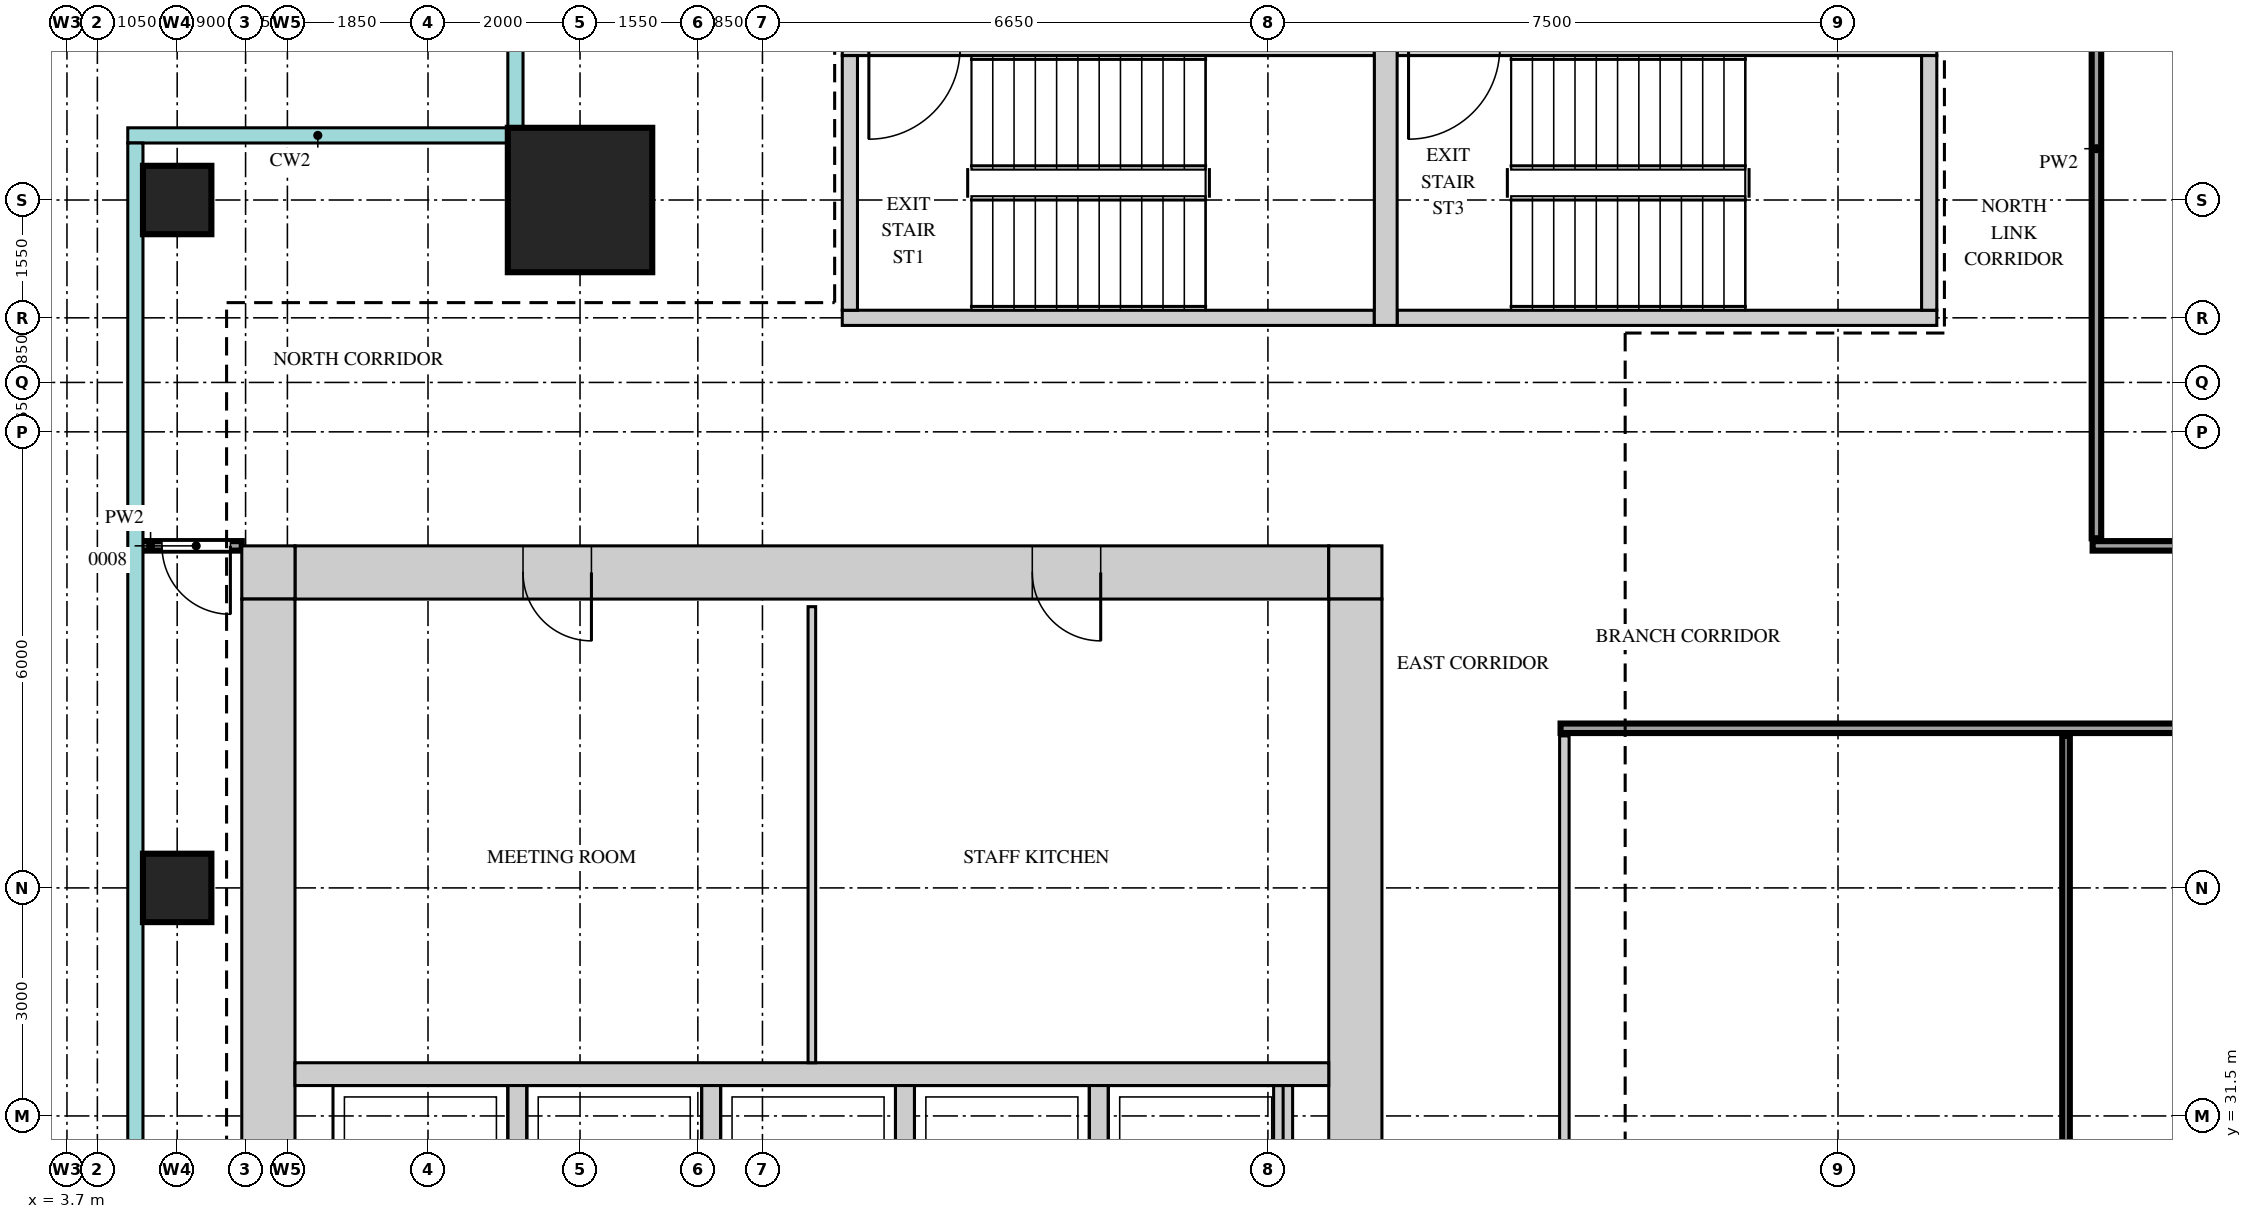
"""IFC4 building model, lengths in metres.
Left out: names, types, materials, properties, quantities, classifications, styles, units other than length and angle.
Written with IfcOpenShell. Run it as: python <this file> out.ifc"""

import sys

from ifc_helpers import new_model, si_unit, direction, frame, frame_2d, origin, origin_2d, place, context, subcontext, project, spatial, rectangle, extrude, source, transform, mapped, element, fill, save


model = new_model("IFC4")
c1 = context("Model", 3, precision=1e-05, world=origin(), true_north=direction((0.0, 1.0)))
c2 = subcontext(c1, "Body", "Model", "MODEL_VIEW")
j1 = project(units=[si_unit("LENGTHUNIT", "METRE"), si_unit("PLANEANGLEUNIT", "RADIAN")], contexts=[c1])
p1 = place(None, origin())
s1 = spatial("IfcSite", under=j1, at=p1, CompositionType="ELEMENT")
p2 = place(p1, origin())
s2 = spatial("IfcBuilding", under=s1, at=p2, CompositionType="ELEMENT")
p3 = place(p2, frame((0.0, 0.0, 230.2)))
s3 = spatial("IfcBuildingStorey", under=s2, at=p3, CompositionType="ELEMENT", Elevation=230.2)
m1 = source(origin(), c2, "Body", "SweptSolid", [
    extrude(rectangle(XDim=13.6, YDim=0.7, at=frame_2d((6.8, 0.0))), origin(), (0.0, 0.0, 1.0), 3.75),
])
p4 = place(p3, frame((6.7, 38.65, 0.0), z_axis=(0.0, 0.0, 1.0), x_axis=(1.0, 0.0, 0.0)))
e1 = element("IfcWall", 1, at=p4, inside=s3, PredefinedType="SHEAR", context=c2, shape_type="MappedRepresentation", body=[
    mapped(m1, transform((0.0, 0.0, 0.0))),
])
m2 = source(origin(), c2, "Body", "SweptSolid", [
    extrude(rectangle(XDim=0.9, YDim=2.1, at=frame_2d((0.45, 1.05))), frame((0.0, 0.36, 0.0), z_axis=(0.0, -1.0, 0.0), x_axis=(1.0, 0.0, 0.0)), (0.0, 0.0, 1.0), 0.72),
])
p5 = place(p4, frame((3.0, 0.0, 0.0)))
e2 = element("IfcOpeningElement", 2, at=p5, cuts=e1, PredefinedType="OPENING", context=c2, shape_type="MappedRepresentation", body=[
    mapped(m2, transform((0.0, 0.0, 0.0))),
])
p6 = place(p4, frame((9.7, 0.0, 0.0)))
e3 = element("IfcOpeningElement", 3, at=p6, cuts=e1, PredefinedType="OPENING", context=c2, shape_type="MappedRepresentation", body=[
    mapped(m2, transform((0.0, 0.0, 0.0))),
])
m3 = source(origin(), c2, "Body", "SweptSolid", [
    extrude(rectangle(XDim=0.7, YDim=0.7, at=frame_2d((0.35, 0.0))), origin(), (0.0, 0.0, 1.0), 3.75),
])
for number, where, z_axis, x_axis in (
    (4, (20.3, 38.65, 0.0), (0.0, 0.0, 1.0), (1.0, 0.0, 0.0)),
    (5, (6.0, 38.65, 0.0), (0.0, 0.0, 1.0), (1.0, 0.0, 0.0)),
):
    element("IfcWall", number, at=place(p3, frame(where, z_axis=z_axis, x_axis=x_axis)), inside=s3, PredefinedType="SHEAR", context=c2, shape_type="MappedRepresentation", body=[
        mapped(m3, transform((0.0, 0.0, 0.0))),
    ])
m4 = source(origin(), c2, "Body", "SweptSolid", [
    extrude(rectangle(XDim=22.6, YDim=0.7, at=frame_2d((11.3, 0.0))), origin(), (0.0, 0.0, 1.0), 3.75),
])
p7 = place(p3, frame((20.65, 15.7, 0.0), z_axis=(0.0, 0.0, 1.0), x_axis=(0.0, 1.0, 0.0)))
e6 = element("IfcWall", 6, at=p7, inside=s3, PredefinedType="SHEAR", context=c2, shape_type="MappedRepresentation", body=[
    mapped(m4, transform((0.0, 0.0, 0.0))),
])
m5 = source(origin(), c2, "Body", "SweptSolid", [
    extrude(rectangle(XDim=1.8, YDim=2.1, at=frame_2d((0.9, 1.05))), frame((0.0, 0.36, 0.0), z_axis=(0.0, -1.0, 0.0), x_axis=(1.0, 0.0, 0.0)), (0.0, 0.0, 1.0), 0.72),
])
p8 = place(p7, frame((10.8, 0.0, 0.0)))
e7 = element("IfcOpeningElement", 7, at=p8, cuts=e6, PredefinedType="OPENING", context=c2, shape_type="MappedRepresentation", body=[
    mapped(m5, transform((0.0, 0.0, 0.0))),
])
p9 = place(p7, frame((0.45, 0.0, 0.0)))
e8 = element("IfcOpeningElement", 8, at=p9, cuts=e6, PredefinedType="OPENING", context=c2, shape_type="MappedRepresentation", body=[
    mapped(m2, transform((0.0, 0.0, 0.0))),
])
p10 = place(p7, frame((2.9, 0.0, 0.0)))
e9 = element("IfcOpeningElement", 9, at=p10, cuts=e6, PredefinedType="OPENING", context=c2, shape_type="MappedRepresentation", body=[
    mapped(m2, transform((0.0, 0.0, 0.0))),
])
p11 = place(p7, frame((5.65, 0.0, 0.0)))
e10 = element("IfcOpeningElement", 10, at=p11, cuts=e6, PredefinedType="OPENING", context=c2, shape_type="MappedRepresentation", body=[
    mapped(m2, transform((0.0, 0.0, 0.0))),
])
p12 = place(p3, frame((6.35, 15.7, 0.0), z_axis=(0.0, 0.0, 1.0), x_axis=(0.0, 1.0, 0.0)))
e11 = element("IfcWall", 11, at=p12, inside=s3, PredefinedType="SHEAR", context=c2, shape_type="MappedRepresentation", body=[
    mapped(m4, transform((0.0, 0.0, 0.0))),
])
m6 = source(origin(), c2, "Body", "SweptSolid", [
    extrude(rectangle(XDim=7.0, YDim=0.2, at=frame_2d((3.5, 0.0))), origin(), (0.0, 0.0, 1.0), 3.75),
])
p13 = place(p3, frame((13.9, 45.55, 0.0), z_axis=(0.0, 0.0, 1.0), x_axis=(1.0, 0.0, 0.0)))
e12 = element("IfcWall", 12, at=p13, inside=s3, PredefinedType="SHEAR", context=c2, shape_type="MappedRepresentation", body=[
    mapped(m6, transform((0.0, 0.0, 0.0))),
])
m7 = source(origin(), c2, "Body", "SweptSolid", [
    extrude(rectangle(XDim=1.2, YDim=2.1, at=frame_2d((0.6, 1.05))), frame((0.0, 0.11, 0.0), z_axis=(0.0, -1.0, 0.0), x_axis=(1.0, 0.0, 0.0)), (0.0, 0.0, 1.0), 0.22),
])
p14 = place(p13, frame((0.35, 0.0, 0.0)))
e13 = element("IfcOpeningElement", 13, at=p14, cuts=e12, PredefinedType="OPENING", context=c2, shape_type="MappedRepresentation", body=[
    mapped(m7, transform((0.0, 0.0, 0.0))),
])
p15 = place(p3, frame((13.9, 42.0, 0.0), z_axis=(0.0, 0.0, 1.0), x_axis=(1.0, 0.0, 0.0)))
e14 = element("IfcWall", 14, at=p15, inside=s3, PredefinedType="SHEAR", context=c2, shape_type="MappedRepresentation", body=[
    mapped(m6, transform((0.0, 0.0, 0.0))),
])
m8 = source(origin(), c2, "Body", "SweptSolid", [
    extrude(rectangle(XDim=7.1, YDim=0.2, at=frame_2d((3.55, 0.0))), origin(), (0.0, 0.0, 1.0), 3.75),
])
p16 = place(p3, frame((21.2, 45.55, 0.0), z_axis=(0.0, 0.0, 1.0), x_axis=(1.0, 0.0, 0.0)))
e15 = element("IfcWall", 15, at=p16, inside=s3, PredefinedType="SHEAR", context=c2, shape_type="MappedRepresentation", body=[
    mapped(m8, transform((0.0, 0.0, 0.0))),
])
p17 = place(p16, frame((0.15, 0.0, 0.0)))
e16 = element("IfcOpeningElement", 16, at=p17, cuts=e15, PredefinedType="OPENING", context=c2, shape_type="MappedRepresentation", body=[
    mapped(m7, transform((0.0, 0.0, 0.0))),
])
p18 = place(p3, frame((21.2, 42.0, 0.0), z_axis=(0.0, 0.0, 1.0), x_axis=(1.0, 0.0, 0.0)))
e17 = element("IfcWall", 17, at=p18, inside=s3, PredefinedType="SHEAR", context=c2, shape_type="MappedRepresentation", body=[
    mapped(m8, transform((0.0, 0.0, 0.0))),
])
m9 = source(origin(), c2, "Body", "SweptSolid", [
    extrude(rectangle(XDim=3.75, YDim=0.3, at=frame_2d((1.875, 0.0))), origin(), (0.0, 0.0, 1.0), 3.75),
])
p19 = place(p3, frame((21.05, 41.9, 0.0), z_axis=(0.0, 0.0, 1.0), x_axis=(0.0, 1.0, 0.0)))
e18 = element("IfcWall", 18, at=p19, inside=s3, PredefinedType="SHEAR", context=c2, shape_type="MappedRepresentation", body=[
    mapped(m9, transform((0.0, 0.0, 0.0))),
])
m10 = source(origin(), c2, "Body", "SweptSolid", [
    extrude(rectangle(XDim=3.35, YDim=0.2, at=frame_2d((1.675, 0.0))), origin(), (0.0, 0.0, 1.0), 3.75),
])
for number, where, z_axis, x_axis in (
    (19, (14.0, 42.1, 0.0), (0.0, 0.0, 1.0), (0.0, 1.0, 0.0)),
    (20, (28.2, 42.1, 0.0), (0.0, 0.0, 1.0), (0.0, 1.0, 0.0)),
):
    element("IfcWall", number, at=place(p3, frame(where, z_axis=z_axis, x_axis=x_axis)), inside=s3, PredefinedType="SHEAR", context=c2, shape_type="MappedRepresentation", body=[
        mapped(m10, transform((0.0, 0.0, 0.0))),
    ])
m11 = source(origin(), c2, "Body", "SweptSolid", [
    extrude(rectangle(XDim=13.6, YDim=0.3, at=frame_2d((6.8, 0.0))), origin(), (0.0, 0.0, 1.0), 3.75),
])
p20 = place(p3, frame((6.7, 32.05, 0.0), z_axis=(0.0, 0.0, 1.0), x_axis=(1.0, 0.0, 0.0)))
e21 = element("IfcWall", 21, at=p20, inside=s3, PredefinedType="STANDARD", context=c2, shape_type="MappedRepresentation", body=[
    mapped(m11, transform((0.0, 0.0, 0.0))),
])
m12 = source(origin(), c2, "Body", "SweptSolid", [
    extrude(rectangle(XDim=2.4, YDim=0.25, at=frame_2d((1.2, 0.0))), origin(), (0.0, 0.0, 1.0), 3.75),
])
for number, where, z_axis, x_axis in (
    (22, (17.275, 29.5, 0.0), (0.0, 0.0, 1.0), (0.0, 1.0, 0.0)),
    (23, (19.7, 29.5, 0.0), (0.0, 0.0, 1.0), (0.0, 1.0, 0.0)),
    (24, (9.625, 29.5, 0.0), (0.0, 0.0, 1.0), (0.0, 1.0, 0.0)),
    (25, (12.175, 29.5, 0.0), (0.0, 0.0, 1.0), (0.0, 1.0, 0.0)),
    (26, (14.725, 29.5, 0.0), (0.0, 0.0, 1.0), (0.0, 1.0, 0.0)),
):
    element("IfcWall", number, at=place(p3, frame(where, z_axis=z_axis, x_axis=x_axis)), inside=s3, PredefinedType="STANDARD", context=c2, shape_type="MappedRepresentation", body=[
        mapped(m12, transform((0.0, 0.0, 0.0))),
    ])
m13 = source(origin(), c2, "Body", "SweptSolid", [
    extrude(rectangle(XDim=1.9, YDim=1.9, at=origin_2d()), origin(), (0.0, 0.0, 1.0), 4.0),
])
p21 = place(p3, frame((10.45, 43.55, 0.0), z_axis=(0.0, 0.0, 1.0), x_axis=(1.0, 0.0, 0.0)))
e27 = element("IfcColumn", 27, at=p21, inside=s3, PredefinedType="COLUMN", context=c2, shape_type="MappedRepresentation", body=[
    mapped(m13, transform((0.0, 0.0, 0.0))),
])
m14 = source(origin(), c2, "Body", "SweptSolid", [
    extrude(rectangle(XDim=0.9, YDim=0.9, at=origin_2d()), origin(), (0.0, 0.0, 1.0), 3.75),
])
for number, where, z_axis, x_axis in (
    (28, (5.15, 34.5, 0.0), (0.0, 0.0, 1.0), (1.0, 0.0, 0.0)),
    (29, (5.15, 43.55, 0.0), (0.0, 0.0, 1.0), (1.0, 0.0, 0.0)),
):
    element("IfcColumn", number, at=place(p3, frame(where, z_axis=z_axis, x_axis=x_axis)), inside=s3, PredefinedType="COLUMN", context=c2, shape_type="MappedRepresentation", body=[
        mapped(m14, transform((0.0, 0.0, 0.0))),
    ])
m15 = source(origin(), c2, "Body", "SweptSolid", [
    extrude(rectangle(XDim=18.4, YDim=0.125, at=frame_2d((9.2, 0.0))), origin(), (0.0, 0.0, 1.0), 3.8),
])
p22 = place(p3, frame((23.4, 18.1, 0.0), z_axis=(0.0, 0.0, 1.0), x_axis=(0.0, 1.0, 0.0)))
e30 = element("IfcWall", 30, at=p22, inside=s3, PredefinedType="PARTITIONING", context=c2, shape_type="MappedRepresentation", body=[
    mapped(m15, transform((0.0, 0.0, 0.0))),
])
m16 = source(origin(), c2, "Body", "SweptSolid", [
    extrude(rectangle(XDim=1.2, YDim=2.1, at=frame_2d((0.6, 1.05))), frame((0.0, 0.073, 0.0), z_axis=(0.0, -1.0, 0.0), x_axis=(1.0, 0.0, 0.0)), (0.0, 0.0, 1.0), 0.145),
])
p23 = place(p22, frame((8.6, 0.0, 0.0)))
e31 = element("IfcOpeningElement", 31, at=p23, cuts=e30, PredefinedType="OPENING", context=c2, shape_type="MappedRepresentation", body=[
    mapped(m16, transform((0.0, 0.0, 0.0))),
])
m17 = source(origin(), c2, "Body", "SweptSolid", [
    extrude(rectangle(XDim=18.4, YDim=0.1, at=frame_2d((9.2, 0.0))), origin(), (0.0, 0.0, 1.0), 3.8),
])
p24 = place(p3, frame((30.0, 18.1, 0.0), z_axis=(0.0, 0.0, 1.0), x_axis=(0.0, 1.0, 0.0)))
e32 = element("IfcWall", 32, at=p24, inside=s3, PredefinedType="PARTITIONING", context=c2, shape_type="MappedRepresentation", body=[
    mapped(m17, transform((0.0, 0.0, 0.0))),
])
m18 = source(origin(), c2, "Body", "SweptSolid", [
    extrude(rectangle(XDim=6.0, YDim=0.1, at=frame_2d((3.0, 0.0))), origin(), (0.0, 0.0, 1.0), 3.8),
])
p25 = place(p3, frame((13.5, 32.2, 0.0), z_axis=(0.0, 0.0, 1.0), x_axis=(0.0, 1.0, 0.0)))
e33 = element("IfcWall", 33, at=p25, inside=s3, PredefinedType="PARTITIONING", context=c2, shape_type="MappedRepresentation", body=[
    mapped(m18, transform((0.0, 0.0, 0.0))),
])
m19 = source(origin(), c2, "Body", "SweptSolid", [
    extrude(rectangle(XDim=26.0, YDim=0.125, at=frame_2d((13.0, 0.0))), origin(), (0.0, 0.0, 1.0), 3.8),
])
p26 = place(p3, frame((23.35, 36.6, 0.0), z_axis=(0.0, 0.0, 1.0), x_axis=(1.0, 0.0, 0.0)))
e34 = element("IfcWall", 34, at=p26, inside=s3, PredefinedType="PARTITIONING", context=c2, shape_type="MappedRepresentation", body=[
    mapped(m19, transform((0.0, 0.0, 0.0))),
])
m20 = source(origin(), c2, "Body", "SweptSolid", [
    extrude(rectangle(XDim=1.35, YDim=0.125, at=frame_2d((0.675, 0.0))), origin(), (0.0, 0.0, 1.0), 3.8),
])
p27 = place(p3, frame((4.65, 39.0, 0.0), z_axis=(0.0, 0.0, 1.0), x_axis=(1.0, 0.0, 0.0)))
e35 = element("IfcWall", 35, at=p27, inside=s3, PredefinedType="PARTITIONING", context=c2, shape_type="MappedRepresentation", body=[
    mapped(m20, transform((0.0, 0.0, 0.0))),
])
m21 = source(origin(), c2, "Body", "SweptSolid", [
    extrude(rectangle(XDim=0.9, YDim=2.1, at=frame_2d((0.45, 1.05))), frame((0.0, 0.073, 0.0), z_axis=(0.0, -1.0, 0.0), x_axis=(1.0, 0.0, 0.0)), (0.0, 0.0, 1.0), 0.145),
])
p28 = place(p27, frame((0.3, 0.0, 0.0)))
e36 = element("IfcOpeningElement", 36, at=p28, cuts=e35, PredefinedType="OPENING", context=c2, shape_type="MappedRepresentation", body=[
    mapped(m21, transform((0.0, 0.0, 0.0))),
])
m22 = source(origin(), c2, "Body", "SweptSolid", [
    extrude(rectangle(XDim=19.0, YDim=0.125, at=frame_2d((9.5, 0.0))), origin(), (0.0, 0.0, 1.0), 3.8),
])
p29 = place(p3, frame((30.35, 39.0, 0.0), z_axis=(0.0, 0.0, 1.0), x_axis=(1.0, 0.0, 0.0)))
e37 = element("IfcWall", 37, at=p29, inside=s3, PredefinedType="PARTITIONING", context=c2, shape_type="MappedRepresentation", body=[
    mapped(m22, transform((0.0, 0.0, 0.0))),
])
p30 = place(p29, frame((1.8, 0.0, 0.0)))
e38 = element("IfcOpeningElement", 38, at=p30, cuts=e37, PredefinedType="OPENING", context=c2, shape_type="MappedRepresentation", body=[
    mapped(m21, transform((0.0, 0.0, 0.0))),
])
p31 = place(p29, frame((11.05, 0.0, 0.0)))
e39 = element("IfcOpeningElement", 39, at=p31, cuts=e37, PredefinedType="OPENING", context=c2, shape_type="MappedRepresentation", body=[
    mapped(m16, transform((0.0, 0.0, 0.0))),
])
m23 = source(origin(), c2, "Body", "SweptSolid", [
    extrude(rectangle(XDim=10.25, YDim=0.125, at=frame_2d((5.125, 0.0))), origin(), (0.0, 0.0, 1.0), 3.8),
])
p32 = place(p3, frame((30.4, 39.1, 0.0), z_axis=(0.0, 0.0, 1.0), x_axis=(0.0, 1.0, 0.0)))
e40 = element("IfcWall", 40, at=p32, inside=s3, PredefinedType="PARTITIONING", context=c2, shape_type="MappedRepresentation", body=[
    mapped(m23, transform((0.0, 0.0, 0.0))),
])
m24 = source(origin(), c2, "Body", "SweptSolid", [
    extrude(rectangle(XDim=0.9, YDim=2.1, at=frame_2d((0.45, 1.05))), frame((0.0, 0.3, 0.0), z_axis=(0.0, -1.0, 0.0), x_axis=(1.0, 0.0, 0.0)), (0.0, 0.0, 1.0), 0.6),
])
p33 = place(p5, origin())
e41 = element("IfcDoor", 41, at=p33, inside=s3, OperationType="SINGLE_SWING_RIGHT", PredefinedType="DOOR", context=c2, shape_type="MappedRepresentation", body=[
    mapped(m24, transform((0.0, 0.0, 0.0))),
])
fill(e2, e41)
p34 = place(p6, origin())
e42 = element("IfcDoor", 42, at=p34, inside=s3, OperationType="SINGLE_SWING_RIGHT", PredefinedType="DOOR", context=c2, shape_type="MappedRepresentation", body=[
    mapped(m24, transform((0.0, 0.0, 0.0))),
])
fill(e3, e42)
m25 = source(origin(), c2, "Body", "SweptSolid", [
    extrude(rectangle(XDim=0.9, YDim=2.1, at=frame_2d((0.45, 1.05))), frame((0.0, 0.025, 0.0), z_axis=(0.0, -1.0, 0.0), x_axis=(1.0, 0.0, 0.0)), (0.0, 0.0, 1.0), 0.05),
])
p35 = place(p28, origin())
e43 = element("IfcDoor", 43, at=p35, inside=s3, OperationType="SINGLE_SWING_RIGHT", PredefinedType="DOOR", context=c2, shape_type="MappedRepresentation", body=[
    mapped(m25, transform((0.0, 0.0, 0.0))),
])
fill(e36, e43)
save(model, sys.argv[1])
